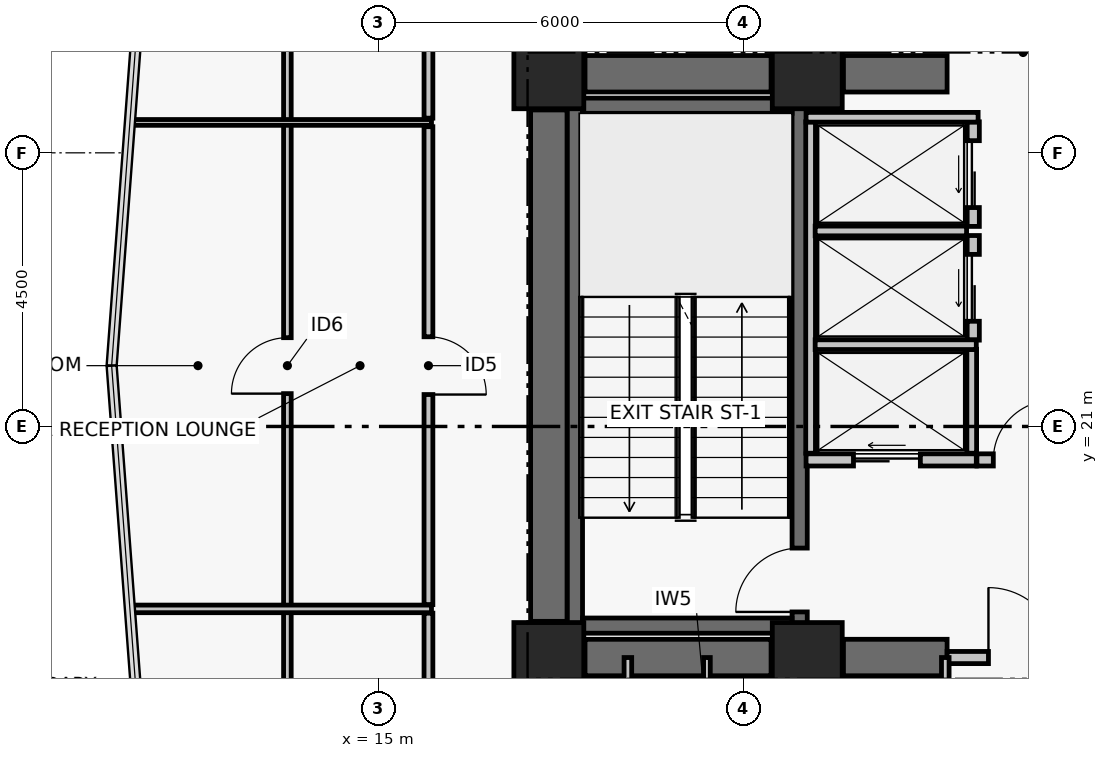
"""IFC4 building model, lengths in metres.
Left out: names, types, materials, properties, quantities, classifications, styles, units other than length and angle.
Written with IfcOpenShell. Run it as: python <this file> out.ifc"""

import sys

from ifc_helpers import new_model, si_unit, direction, frame, frame_2d, origin, origin_2d, place, context, subcontext, project, spatial, rectangle, extrude, element, fill, save


model = new_model("IFC4")
c1 = context("Model", 3, precision=1e-05, world=origin(), true_north=direction((0.0, 1.0)))
c2 = subcontext(c1, "Body", "Model", "MODEL_VIEW")
j1 = project(units=[si_unit("LENGTHUNIT", "METRE"), si_unit("PLANEANGLEUNIT", "RADIAN")], contexts=[c1])
p1 = place(None, origin())
s1 = spatial("IfcSite", under=j1, at=p1, CompositionType="ELEMENT")
p2 = place(p1, origin())
s2 = spatial("IfcBuilding", under=s1, at=p2, CompositionType="ELEMENT")
p3 = place(p2, frame((0.0, 0.0, 68.52)))
s3 = spatial("IfcBuildingStorey", under=s2, at=p3, CompositionType="ELEMENT", Elevation=68.52)
for number, where, z_axis, x_axis in (
    (1, (17.8, 17.2, 0.0), (0.0, 0.0, 1.0), (1.0, 0.0, 0.0)),
    (2, (22.05, 17.2, 0.0), (0.0, 0.0, 1.0), (1.0, 0.0, 0.0)),
    (3, (17.8, 26.8, 0.0), (0.0, 0.0, 1.0), (1.0, 0.0, 0.0)),
    (4, (22.05, 26.8, 0.0), (0.0, 0.0, 1.0), (1.0, 0.0, 0.0)),
):
    element("IfcColumn", number, at=place(p3, frame(where, z_axis=z_axis, x_axis=x_axis)), inside=s3, PredefinedType="COLUMN", context=c2, shape_type="SweptSolid", body=[
        extrude(rectangle(XDim=1.15, YDim=1.15, at=origin_2d()), origin(), (0.0, 0.0, 1.0), 3.72),
    ])
p4 = place(p3, frame((18.395, 17.2, 0.0), z_axis=(0.0, 0.0, 1.0), x_axis=(1.0, 0.0, 0.0)))
e5 = element("IfcWall", 5, at=p4, inside=s3, PredefinedType="SHEAR", context=c2, shape_type="SweptSolid", body=[
    extrude(rectangle(XDim=3.06, YDim=0.6, at=frame_2d((1.53, 0.0))), origin(), (0.0, 0.0, 1.0), 3.47),
])
p5 = place(p3, frame((22.645, 17.2, 0.0), z_axis=(0.0, 0.0, 1.0), x_axis=(1.0, 0.0, 0.0)))
e6 = element("IfcWall", 6, at=p5, inside=s3, PredefinedType="SHEAR", context=c2, shape_type="SweptSolid", body=[
    extrude(rectangle(XDim=1.705, YDim=0.6, at=frame_2d((0.853, 0.0))), origin(), (0.0, 0.0, 1.0), 3.47),
])
p6 = place(p3, frame((18.395, 26.8, 0.0), z_axis=(0.0, 0.0, 1.0), x_axis=(1.0, 0.0, 0.0)))
e7 = element("IfcWall", 7, at=p6, inside=s3, PredefinedType="SHEAR", context=c2, shape_type="SweptSolid", body=[
    extrude(rectangle(XDim=3.06, YDim=0.6, at=frame_2d((1.53, 0.0))), origin(), (0.0, 0.0, 1.0), 3.47),
])
p7 = place(p3, frame((22.645, 26.8, 0.0), z_axis=(0.0, 0.0, 1.0), x_axis=(1.0, 0.0, 0.0)))
e8 = element("IfcWall", 8, at=p7, inside=s3, PredefinedType="SHEAR", context=c2, shape_type="SweptSolid", body=[
    extrude(rectangle(XDim=1.705, YDim=0.6, at=frame_2d((0.853, 0.0))), origin(), (0.0, 0.0, 1.0), 3.47),
])
p8 = place(p3, frame((17.8, 17.795, 0.0), z_axis=(0.0, 0.0, 1.0), x_axis=(0.0, 1.0, 0.0)))
e9 = element("IfcWall", 9, at=p8, inside=s3, PredefinedType="SHEAR", context=c2, shape_type="SweptSolid", body=[
    extrude(rectangle(XDim=8.41, YDim=0.6, at=frame_2d((4.205, 0.0))), origin(), (0.0, 0.0, 1.0), 3.47),
])
p9 = place(p3, frame((18.229, 17.6, 0.0), z_axis=(0.0, 0.0, 1.0), x_axis=(0.0, 1.0, 0.0)))
e10 = element("IfcWall", 10, at=p9, inside=s3, PredefinedType="SHEAR", context=c2, shape_type="SweptSolid", body=[
    extrude(rectangle(XDim=8.8, YDim=0.25, at=frame_2d((4.4, 0.0))), origin(), (0.0, 0.0, 1.0), 3.47),
])
p10 = place(p3, frame((21.925, 17.6, 0.0), z_axis=(0.0, 0.0, 1.0), x_axis=(0.0, 1.0, 0.0)))
e11 = element("IfcWall", 11, at=p10, inside=s3, PredefinedType="SHEAR", context=c2, shape_type="SweptSolid", body=[
    extrude(rectangle(XDim=8.8, YDim=0.25, at=frame_2d((4.4, 0.0))), origin(), (0.0, 0.0, 1.0), 3.47),
])
p11 = place(p10, frame((0.35, 0.0, 0.0)))
e12 = element("IfcOpeningElement", 12, at=p11, cuts=e11, PredefinedType="OPENING", context=c2, shape_type="SweptSolid", body=[
    extrude(rectangle(XDim=1.05, YDim=2.08, at=frame_2d((0.525, 1.04))), frame((0.0, 0.135, 0.0), z_axis=(0.0, -1.0, 0.0), x_axis=(1.0, 0.0, 0.0)), (0.0, 0.0, 1.0), 0.27),
])
for number, where, z_axis, x_axis in (
    (13, (18.354, 17.725, 0.0), (0.0, 0.0, 1.0), (1.0, 0.0, 0.0)),
    (14, (18.354, 26.275, 0.0), (0.0, 0.0, 1.0), (1.0, 0.0, 0.0)),
):
    element("IfcWall", number, at=place(p3, frame(where, z_axis=z_axis, x_axis=x_axis)), inside=s3, PredefinedType="SHEAR", context=c2, shape_type="SweptSolid", body=[
        extrude(rectangle(XDim=3.446, YDim=0.25, at=frame_2d((1.723, 0.0))), origin(), (0.0, 0.0, 1.0), 3.47),
    ])
p12 = place(p3, frame((24.35, 17.2, 0.0), z_axis=(0.0, 0.0, 1.0), x_axis=(1.0, 0.0, 0.0)))
e15 = element("IfcWall", 15, at=p12, inside=s3, PredefinedType="PARTITIONING", context=c2, shape_type="SweptSolid", body=[
    extrude(rectangle(XDim=2.5, YDim=0.2, at=frame_2d((1.25, 0.0))), origin(), (0.0, 0.0, 1.0), 2.6),
])
p13 = place(p12, frame((0.68, 0.0, 0.0)))
e16 = element("IfcOpeningElement", 16, at=p13, cuts=e15, PredefinedType="OPENING", context=c2, shape_type="SweptSolid", body=[
    extrude(rectangle(XDim=1.15, YDim=2.08, at=frame_2d((0.575, 1.04))), frame((0.0, 0.11, 0.0), z_axis=(0.0, -1.0, 0.0), x_axis=(1.0, 0.0, 0.0)), (0.0, 0.0, 1.0), 0.22),
])
p14 = place(p3, frame((24.84, 20.45, 0.0), z_axis=(0.0, 0.0, 1.0), x_axis=(1.0, 0.0, 0.0)))
e17 = element("IfcWall", 17, at=p14, inside=s3, PredefinedType="PARTITIONING", context=c2, shape_type="SweptSolid", body=[
    extrude(rectangle(XDim=1.52, YDim=0.2, at=frame_2d((0.76, 0.0))), origin(), (0.0, 0.0, 1.0), 3.47),
])
p15 = place(p14, frame((0.27, 0.0, 0.0)))
e18 = element("IfcOpeningElement", 18, at=p15, cuts=e17, PredefinedType="OPENING", context=c2, shape_type="SweptSolid", body=[
    extrude(rectangle(XDim=0.98, YDim=2.06, at=frame_2d((0.49, 1.03))), frame((0.0, 0.11, 0.0), z_axis=(0.0, -1.0, 0.0), x_axis=(1.0, 0.0, 0.0)), (0.0, 0.0, 1.0), 0.22),
])
p16 = place(p3, frame((22.03, 20.45, 0.0), z_axis=(0.0, 0.0, 1.0), x_axis=(1.0, 0.0, 0.0)))
e19 = element("IfcWall", 19, at=p16, inside=s3, PredefinedType="PARTITIONING", context=c2, shape_type="SweptSolid", body=[
    extrude(rectangle(XDim=2.8, YDim=0.2, at=frame_2d((1.4, 0.0))), origin(), (0.0, 0.0, 1.0), 3.47),
])
p17 = place(p16, frame((0.78, 0.0, 0.0)))
e20 = element("IfcOpeningElement", 20, at=p17, cuts=e19, PredefinedType="OPENING", context=c2, shape_type="SweptSolid", body=[
    extrude(rectangle(XDim=1.1, YDim=2.08, at=frame_2d((0.55, 1.04))), frame((0.0, 0.11, 0.0), z_axis=(0.0, -1.0, 0.0), x_axis=(1.0, 0.0, 0.0)), (0.0, 0.0, 1.0), 0.22),
])
p18 = place(p3, frame((24.78, 22.42, 0.0), z_axis=(0.0, 0.0, 1.0), x_axis=(0.0, 1.0, 0.0)))
e21 = element("IfcWall", 21, at=p18, inside=s3, PredefinedType="PARTITIONING", context=c2, shape_type="SweptSolid", body=[
    extrude(rectangle(XDim=1.72, YDim=0.2, at=frame_2d((0.86, 0.0))), origin(), (0.0, 0.0, 1.0), 3.47),
])
p19 = place(p18, frame((0.31, 0.0, 0.0)))
e22 = element("IfcOpeningElement", 22, at=p19, cuts=e21, PredefinedType="OPENING", context=c2, shape_type="SweptSolid", body=[
    extrude(rectangle(XDim=1.1, YDim=2.08, at=frame_2d((0.55, 1.04))), frame((0.0, 0.11, 0.0), z_axis=(0.0, -1.0, 0.0), x_axis=(1.0, 0.0, 0.0)), (0.0, 0.0, 1.0), 0.22),
])
p20 = place(p3, frame((24.78, 24.29, 0.0), z_axis=(0.0, 0.0, 1.0), x_axis=(0.0, 1.0, 0.0)))
e23 = element("IfcWall", 23, at=p20, inside=s3, PredefinedType="PARTITIONING", context=c2, shape_type="SweptSolid", body=[
    extrude(rectangle(XDim=1.72, YDim=0.2, at=frame_2d((0.86, 0.0))), origin(), (0.0, 0.0, 1.0), 3.47),
])
p21 = place(p20, frame((0.31, 0.0, 0.0)))
e24 = element("IfcOpeningElement", 24, at=p21, cuts=e23, PredefinedType="OPENING", context=c2, shape_type="SweptSolid", body=[
    extrude(rectangle(XDim=1.1, YDim=2.08, at=frame_2d((0.55, 1.04))), frame((0.0, 0.11, 0.0), z_axis=(0.0, -1.0, 0.0), x_axis=(1.0, 0.0, 0.0)), (0.0, 0.0, 1.0), 0.22),
])
p22 = place(p3, frame((22.105, 20.56, 0.0), z_axis=(0.0, 0.0, 1.0), x_axis=(0.0, 1.0, 0.0)))
e25 = element("IfcWall", 25, at=p22, inside=s3, PredefinedType="PARTITIONING", context=c2, shape_type="SweptSolid", body=[
    extrude(rectangle(XDim=5.45, YDim=0.16, at=frame_2d((2.725, 0.0))), origin(), (0.0, 0.0, 1.0), 3.47),
])
p23 = place(p3, frame((24.755, 20.56, 0.0), z_axis=(0.0, 0.0, 1.0), x_axis=(0.0, 1.0, 0.0)))
e26 = element("IfcWall", 26, at=p23, inside=s3, PredefinedType="PARTITIONING", context=c2, shape_type="SweptSolid", body=[
    extrude(rectangle(XDim=1.71, YDim=0.16, at=frame_2d((0.855, 0.0))), origin(), (0.0, 0.0, 1.0), 3.47),
])
p24 = place(p3, frame((22.18, 22.345, 0.0), z_axis=(0.0, 0.0, 1.0), x_axis=(1.0, 0.0, 0.0)))
e27 = element("IfcWall", 27, at=p24, inside=s3, PredefinedType="PARTITIONING", context=c2, shape_type="SweptSolid", body=[
    extrude(rectangle(XDim=2.65, YDim=0.16, at=frame_2d((1.325, 0.0))), origin(), (0.0, 0.0, 1.0), 3.47),
])
p25 = place(p3, frame((22.18, 24.215, 0.0), z_axis=(0.0, 0.0, 1.0), x_axis=(1.0, 0.0, 0.0)))
e28 = element("IfcWall", 28, at=p25, inside=s3, PredefinedType="PARTITIONING", context=c2, shape_type="SweptSolid", body=[
    extrude(rectangle(XDim=2.49, YDim=0.16, at=frame_2d((1.245, 0.0))), origin(), (0.0, 0.0, 1.0), 3.47),
])
p26 = place(p3, frame((22.03, 26.085, 0.0), z_axis=(0.0, 0.0, 1.0), x_axis=(1.0, 0.0, 0.0)))
e29 = element("IfcWall", 29, at=p26, inside=s3, PredefinedType="PARTITIONING", context=c2, shape_type="SweptSolid", body=[
    extrude(rectangle(XDim=2.83, YDim=0.16, at=frame_2d((1.415, 0.0))), origin(), (0.0, 0.0, 1.0), 3.47),
])
p27 = place(p3, frame((19.1, 14.95, 0.0), z_axis=(0.0, 0.0, 1.0), x_axis=(0.0, 1.0, 0.0)))
e30 = element("IfcWall", 30, at=p27, inside=s3, PredefinedType="PARTITIONING", context=c2, shape_type="SweptSolid", body=[
    extrude(rectangle(XDim=2.25, YDim=0.125, at=frame_2d((1.125, 0.0))), origin(), (0.0, 0.0, 1.0), 2.6),
])
p28 = place(p3, frame((20.4, 14.95, 0.0), z_axis=(0.0, 0.0, 1.0), x_axis=(0.0, 1.0, 0.0)))
e31 = element("IfcWall", 31, at=p28, inside=s3, PredefinedType="PARTITIONING", context=c2, shape_type="SweptSolid", body=[
    extrude(rectangle(XDim=2.25, YDim=0.11, at=frame_2d((1.125, 0.0))), origin(), (0.0, 0.0, 1.0), 2.6),
])
p29 = place(p3, frame((22.36, 14.95, 0.0), z_axis=(0.0, 0.0, 1.0), x_axis=(0.0, 1.0, 0.0)))
e32 = element("IfcWall", 32, at=p29, inside=s3, PredefinedType="PARTITIONING", context=c2, shape_type="SweptSolid", body=[
    extrude(rectangle(XDim=2.25, YDim=0.125, at=frame_2d((1.125, 0.0))), origin(), (0.0, 0.0, 1.0), 2.2),
])
p30 = place(p3, frame((24.32, 14.95, 0.0), z_axis=(0.0, 0.0, 1.0), x_axis=(0.0, 1.0, 0.0)))
e33 = element("IfcWall", 33, at=p30, inside=s3, PredefinedType="PARTITIONING", context=c2, shape_type="SweptSolid", body=[
    extrude(rectangle(XDim=2.25, YDim=0.125, at=frame_2d((1.125, 0.0))), origin(), (0.0, 0.0, 1.0), 2.6),
])
p31 = place(p3, frame((15.82, 17.93, 0.0), z_axis=(0.0, 0.0, 1.0), x_axis=(0.0, -1.0, 0.0)))
e34 = element("IfcWall", 34, at=p31, inside=s3, PredefinedType="PARTITIONING", context=c2, shape_type="SweptSolid", body=[
    extrude(rectangle(XDim=4.64, YDim=0.145, at=frame_2d((2.32, 0.0))), origin(), (0.0, 0.0, 1.0), 2.2),
])
p32 = place(p3, frame((15.82, 28.7, 0.0), z_axis=(0.0, 0.0, 1.0), x_axis=(0.0, -1.0, 0.0)))
e35 = element("IfcWall", 35, at=p32, inside=s3, PredefinedType="PARTITIONING", context=c2, shape_type="SweptSolid", body=[
    extrude(rectangle(XDim=2.63, YDim=0.145, at=frame_2d((1.315, 0.0))), origin(), (0.0, 0.0, 1.0), 2.2),
])
p33 = place(p3, frame((15.82, 25.93, 0.0), z_axis=(0.0, 0.0, 1.0), x_axis=(0.0, -1.0, 0.0)))
e36 = element("IfcWall", 36, at=p33, inside=s3, PredefinedType="PARTITIONING", context=c2, shape_type="SweptSolid", body=[
    extrude(rectangle(XDim=7.86, YDim=0.145, at=frame_2d((3.93, 0.0))), origin(), (0.0, 0.0, 1.0), 3.47),
])
p34 = place(p33, frame((3.455, 0.0, 0.0)))
e37 = element("IfcOpeningElement", 37, at=p34, cuts=e36, PredefinedType="OPENING", context=c2, shape_type="SweptSolid", body=[
    extrude(rectangle(XDim=0.95, YDim=2.06, at=frame_2d((0.475, 1.03))), frame((0.0, 0.083, 0.0), z_axis=(0.0, -1.0, 0.0), x_axis=(1.0, 0.0, 0.0)), (0.0, 0.0, 1.0), 0.165),
])
p35 = place(p3, frame((13.5, 7.123, 0.0), z_axis=(0.0, 0.0, 1.0), x_axis=(0.0, 1.0, 0.0)))
e38 = element("IfcWall", 38, at=p35, inside=s3, PredefinedType="PARTITIONING", context=c2, shape_type="SweptSolid", body=[
    extrude(rectangle(XDim=29.754, YDim=0.125, at=frame_2d((14.877, 0.0))), origin(), (0.0, 0.0, 1.0), 2.2),
])
p36 = place(p35, frame((3.888, 0.0, 0.0)))
e39 = element("IfcOpeningElement", 39, at=p36, cuts=e38, PredefinedType="OPENING", context=c2, shape_type="SweptSolid", body=[
    extrude(rectangle(XDim=0.92, YDim=2.05, at=frame_2d((0.46, 1.025))), frame((0.0, 0.073, 0.0), z_axis=(0.0, -1.0, 0.0), x_axis=(1.0, 0.0, 0.0)), (0.0, 0.0, 1.0), 0.145),
])
p37 = place(p35, frame((24.946, 0.0, 0.0)))
e40 = element("IfcOpeningElement", 40, at=p37, cuts=e38, PredefinedType="OPENING", context=c2, shape_type="SweptSolid", body=[
    extrude(rectangle(XDim=0.92, YDim=2.05, at=frame_2d((0.46, 1.025))), frame((0.0, 0.073, 0.0), z_axis=(0.0, -1.0, 0.0), x_axis=(1.0, 0.0, 0.0)), (0.0, 0.0, 1.0), 0.145),
])
p38 = place(p35, frame((14.417, 0.0, 0.0)))
e41 = element("IfcOpeningElement", 41, at=p38, cuts=e38, PredefinedType="OPENING", context=c2, shape_type="SweptSolid", body=[
    extrude(rectangle(XDim=0.92, YDim=2.05, at=frame_2d((0.46, 1.025))), frame((0.0, 0.073, 0.0), z_axis=(0.0, -1.0, 0.0), x_axis=(1.0, 0.0, 0.0)), (0.0, 0.0, 1.0), 0.145),
])
p39 = place(p3, frame((10.9, 18.0, 0.0), z_axis=(0.0, 0.0, 1.0), x_axis=(1.0, 0.0, 0.0)))
e42 = element("IfcWall", 42, at=p39, inside=s3, PredefinedType="PARTITIONING", context=c2, shape_type="SweptSolid", body=[
    extrude(rectangle(XDim=4.97, YDim=0.125, at=frame_2d((2.485, 0.0))), origin(), (0.0, 0.0, 1.0), 2.85),
])
p40 = place(p3, frame((10.9, 26.0, 0.0), z_axis=(0.0, 0.0, 1.0), x_axis=(1.0, 0.0, 0.0)))
e43 = element("IfcWall", 43, at=p40, inside=s3, PredefinedType="PARTITIONING", context=c2, shape_type="SweptSolid", body=[
    extrude(rectangle(XDim=4.97, YDim=0.095, at=frame_2d((2.485, 0.0))), origin(), (0.0, 0.0, 1.0), 2.85),
])
p41 = place(p11, origin())
e44 = element("IfcDoor", 44, at=p41, inside=s3, OperationType="SINGLE_SWING_LEFT", PredefinedType="DOOR", context=c2, shape_type="SweptSolid", body=[
    extrude(rectangle(XDim=1.05, YDim=2.08, at=frame_2d((0.525, 1.04))), frame((0.0, 0.025, 0.0), z_axis=(0.0, -1.0, 0.0), x_axis=(1.0, 0.0, 0.0)), (0.0, 0.0, 1.0), 0.05),
])
fill(e12, e44)
p42 = place(p13, origin())
e45 = element("IfcDoor", 45, at=p42, inside=s3, OperationType="SINGLE_SWING_LEFT", PredefinedType="DOOR", context=c2, shape_type="SweptSolid", body=[
    extrude(rectangle(XDim=1.15, YDim=2.08, at=frame_2d((0.575, 1.04))), frame((0.0, 0.025, 0.0), z_axis=(0.0, -1.0, 0.0), x_axis=(1.0, 0.0, 0.0)), (0.0, 0.0, 1.0), 0.05),
])
fill(e16, e45)
p43 = place(p15, origin())
e46 = element("IfcDoor", 46, at=p43, inside=s3, OperationType="SINGLE_SWING_RIGHT", PredefinedType="DOOR", context=c2, shape_type="SweptSolid", body=[
    extrude(rectangle(XDim=0.98, YDim=2.06, at=frame_2d((0.49, 1.03))), frame((0.0, 0.025, 0.0), z_axis=(0.0, -1.0, 0.0), x_axis=(1.0, 0.0, 0.0)), (0.0, 0.0, 1.0), 0.05),
])
fill(e18, e46)
p44 = place(p17, origin())
e47 = element("IfcDoor", 47, at=p44, inside=s3, OperationType="DOUBLE_DOOR_SLIDING", PredefinedType="DOOR", context=c2, shape_type="SweptSolid", body=[
    extrude(rectangle(XDim=1.1, YDim=2.08, at=frame_2d((0.55, 1.04))), frame((0.0, 0.025, 0.0), z_axis=(0.0, -1.0, 0.0), x_axis=(1.0, 0.0, 0.0)), (0.0, 0.0, 1.0), 0.05),
])
fill(e20, e47)
p45 = place(p19, origin())
e48 = element("IfcDoor", 48, at=p45, inside=s3, OperationType="DOUBLE_DOOR_SLIDING", PredefinedType="DOOR", context=c2, shape_type="SweptSolid", body=[
    extrude(rectangle(XDim=1.1, YDim=2.08, at=frame_2d((0.55, 1.04))), frame((0.0, 0.025, 0.0), z_axis=(0.0, -1.0, 0.0), x_axis=(1.0, 0.0, 0.0)), (0.0, 0.0, 1.0), 0.05),
])
fill(e22, e48)
p46 = place(p21, origin())
e49 = element("IfcDoor", 49, at=p46, inside=s3, OperationType="DOUBLE_DOOR_SLIDING", PredefinedType="DOOR", context=c2, shape_type="SweptSolid", body=[
    extrude(rectangle(XDim=1.1, YDim=2.08, at=frame_2d((0.55, 1.04))), frame((0.0, 0.025, 0.0), z_axis=(0.0, -1.0, 0.0), x_axis=(1.0, 0.0, 0.0)), (0.0, 0.0, 1.0), 0.05),
])
fill(e24, e49)
p47 = place(p34, origin())
e50 = element("IfcDoor", 50, at=p47, inside=s3, OperationType="SINGLE_SWING_RIGHT", PredefinedType="DOOR", context=c2, shape_type="SweptSolid", body=[
    extrude(rectangle(XDim=0.95, YDim=2.06, at=frame_2d((0.475, 1.03))), frame((0.0, 0.025, 0.0), z_axis=(0.0, -1.0, 0.0), x_axis=(1.0, 0.0, 0.0)), (0.0, 0.0, 1.0), 0.05),
])
fill(e37, e50)
p48 = place(p38, origin())
e51 = element("IfcDoor", 51, at=p48, inside=s3, OperationType="SINGLE_SWING_LEFT", PredefinedType="DOOR", context=c2, shape_type="SweptSolid", body=[
    extrude(rectangle(XDim=0.92, YDim=2.05, at=frame_2d((0.46, 1.025))), frame((0.0, 0.025, 0.0), z_axis=(0.0, -1.0, 0.0), x_axis=(1.0, 0.0, 0.0)), (0.0, 0.0, 1.0), 0.05),
])
fill(e41, e51)
save(model, sys.argv[1])
